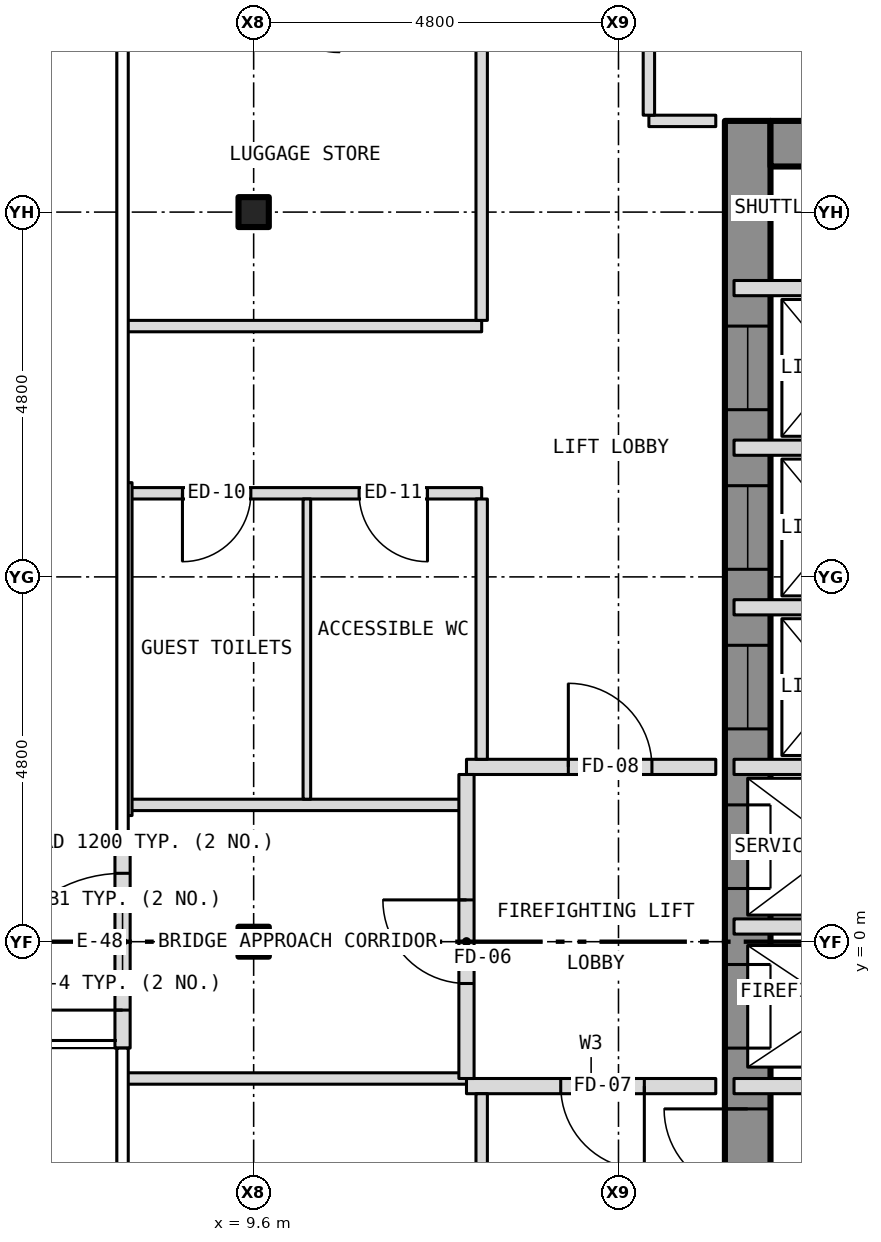
"""IFC4 building model, lengths in metres.
Left out: names, types, materials, properties, quantities, classifications, styles, units other than length and angle.
Written with IfcOpenShell. Run it as: python <this file> out.ifc"""

import sys

from ifc_helpers import new_model, si_unit, direction, frame, frame_2d, origin, origin_2d, place, context, subcontext, project, spatial, rectangle, i_section, extrude, element, fill, save


model = new_model("IFC4")
c1 = context("Model", 3, precision=1e-05, world=origin(), true_north=direction((0.0, 1.0)))
c2 = subcontext(c1, "Body", "Model", "MODEL_VIEW")
j1 = project(units=[si_unit("LENGTHUNIT", "METRE"), si_unit("PLANEANGLEUNIT", "RADIAN")], contexts=[c1])
p1 = place(None, origin())
s1 = spatial("IfcSite", under=j1, at=p1, CompositionType="ELEMENT")
p2 = place(p1, origin())
s2 = spatial("IfcBuilding", under=s1, at=p2, CompositionType="ELEMENT")
p3 = place(p2, frame((0.0, 0.0, 124.0)))
s3 = spatial("IfcBuildingStorey", under=s2, at=p3, CompositionType="ELEMENT", Elevation=124.0)
for number, where, z_axis, x_axis in (
    (1, (9.6, 0.0, -0.15), (0.0, 0.0, 1.0), (1.0, 0.0, 0.0)),
    (2, (9.6, 9.6, -0.15), (0.0, 0.0, 1.0), (1.0, 0.0, 0.0)),
):
    element("IfcColumn", number, at=place(p3, frame(where, z_axis=z_axis, x_axis=x_axis)), inside=s3, PredefinedType="COLUMN", context=c2, shape_type="SweptSolid", body=[
        extrude(i_section(OverallWidth=0.399, OverallDepth=0.394, WebThickness=0.023, FlangeThickness=0.037, at=origin_2d()), origin(), (0.0, 0.0, 1.0), 3.5),
    ])
p4 = place(p3, frame((16.1, -10.8, 0.0), z_axis=(0.0, 0.0, 1.0), x_axis=(0.0, 1.0, 0.0)))
e3 = element("IfcWall", 3, at=p4, inside=s3, PredefinedType="SHEAR", context=c2, shape_type="SweptSolid", body=[
    extrude(rectangle(XDim=21.6, YDim=0.6, at=frame_2d((10.8, 0.0))), origin(), (0.0, 0.0, 1.0), 3.25),
])
p5 = place(p4, frame((9.4, 0.0, 0.0)))
e4 = element("IfcOpeningElement", 4, at=p5, cuts=e3, PredefinedType="OPENING", context=c2, shape_type="SweptSolid", body=[
    extrude(rectangle(XDim=1.1, YDim=2.1, at=frame_2d((0.55, 1.05))), frame((0.0, 0.312, 0.0), z_axis=(0.0, -1.0, 0.0), x_axis=(1.0, 0.0, 0.0)), (0.0, 0.0, 1.0), 0.624),
])
p6 = place(p4, frame((11.5, 0.0, 0.0)))
e5 = element("IfcOpeningElement", 5, at=p6, cuts=e3, PredefinedType="OPENING", context=c2, shape_type="SweptSolid", body=[
    extrude(rectangle(XDim=1.1, YDim=2.1, at=frame_2d((0.55, 1.05))), frame((0.0, 0.312, 0.0), z_axis=(0.0, -1.0, 0.0), x_axis=(1.0, 0.0, 0.0)), (0.0, 0.0, 1.0), 0.624),
])
p7 = place(p4, frame((13.6, 0.0, 0.0)))
e6 = element("IfcOpeningElement", 6, at=p7, cuts=e3, PredefinedType="OPENING", context=c2, shape_type="SweptSolid", body=[
    extrude(rectangle(XDim=1.1, YDim=2.1, at=frame_2d((0.55, 1.05))), frame((0.0, 0.312, 0.0), z_axis=(0.0, -1.0, 0.0), x_axis=(1.0, 0.0, 0.0)), (0.0, 0.0, 1.0), 0.624),
])
p8 = place(p4, frame((15.7, 0.0, 0.0)))
e7 = element("IfcOpeningElement", 7, at=p8, cuts=e3, PredefinedType="OPENING", context=c2, shape_type="SweptSolid", body=[
    extrude(rectangle(XDim=1.1, YDim=2.1, at=frame_2d((0.55, 1.05))), frame((0.0, 0.312, 0.0), z_axis=(0.0, -1.0, 0.0), x_axis=(1.0, 0.0, 0.0)), (0.0, 0.0, 1.0), 0.624),
])
p9 = place(p4, frame((17.8, 0.0, 0.0)))
e8 = element("IfcOpeningElement", 8, at=p9, cuts=e3, PredefinedType="OPENING", context=c2, shape_type="SweptSolid", body=[
    extrude(rectangle(XDim=1.1, YDim=2.1, at=frame_2d((0.55, 1.05))), frame((0.0, 0.312, 0.0), z_axis=(0.0, -1.0, 0.0), x_axis=(1.0, 0.0, 0.0)), (0.0, 0.0, 1.0), 0.624),
])
p10 = place(p4, frame((5.642, 0.0, 0.0)))
e9 = element("IfcOpeningElement", 9, at=p10, cuts=e3, PredefinedType="OPENING", context=c2, shape_type="SweptSolid", body=[
    extrude(rectangle(XDim=1.1, YDim=2.1, at=frame_2d((0.55, 1.05))), frame((0.0, 0.312, 0.0), z_axis=(0.0, -1.0, 0.0), x_axis=(1.0, 0.0, 0.0)), (0.0, 0.0, 1.0), 0.624),
])
p11 = place(p4, frame((7.5, 0.0, 0.0)))
e10 = element("IfcOpeningElement", 10, at=p11, cuts=e3, PredefinedType="OPENING", context=c2, shape_type="SweptSolid", body=[
    extrude(rectangle(XDim=1.1, YDim=2.1, at=frame_2d((0.55, 1.05))), frame((0.0, 0.312, 0.0), z_axis=(0.0, -1.0, 0.0), x_axis=(1.0, 0.0, 0.0)), (0.0, 0.0, 1.0), 0.624),
])
p12 = place(p3, frame((16.4, 10.5, 0.0), z_axis=(0.0, 0.0, 1.0), x_axis=(1.0, 0.0, 0.0)))
e11 = element("IfcWall", 11, at=p12, inside=s3, PredefinedType="SHEAR", context=c2, shape_type="SweptSolid", body=[
    extrude(rectangle(XDim=5.8, YDim=0.6, at=frame_2d((2.9, 0.0))), origin(), (0.0, 0.0, 1.0), 3.25),
])
p13 = place(p3, frame((7.875, -1.4, 0.0), z_axis=(0.0, 0.0, 1.0), x_axis=(0.0, 1.0, 0.0)))
e12 = element("IfcWall", 12, at=p13, inside=s3, PredefinedType="SOLIDWALL", context=c2, shape_type="SweptSolid", body=[
    extrude(rectangle(XDim=2.8, YDim=0.2, at=frame_2d((1.4, 0.0))), origin(), (0.0, 0.0, 1.0), 3.5),
])
p14 = place(p13, frame((0.5, 0.0, 0.0)))
e13 = element("IfcOpeningElement", 13, at=p14, cuts=e12, PredefinedType="OPENING", context=c2, shape_type="SweptSolid", body=[
    extrude(rectangle(XDim=1.8, YDim=2.1, at=frame_2d((0.9, 1.05))), frame((0.0, 0.112, 0.0), z_axis=(0.0, -1.0, 0.0), x_axis=(1.0, 0.0, 0.0)), (0.0, 0.0, 1.0), 0.224),
])
p15 = place(p3, frame((12.4, -1.9, 0.0), z_axis=(0.0, 0.0, 1.0), x_axis=(1.0, 0.0, 0.0)))
e14 = element("IfcWall", 14, at=p15, inside=s3, PredefinedType="PARTITIONING", context=c2, shape_type="SweptSolid", body=[
    extrude(rectangle(XDim=3.28, YDim=0.2, at=frame_2d((1.64, 0.0))), origin(), (0.0, 0.0, 1.0), 3.35),
])
p16 = place(p15, frame((1.24, 0.0, 0.0)))
e15 = element("IfcOpeningElement", 15, at=p16, cuts=e14, PredefinedType="OPENING", context=c2, shape_type="SweptSolid", body=[
    extrude(rectangle(XDim=1.1, YDim=2.1, at=frame_2d((0.55, 1.05))), frame((0.0, 0.112, 0.0), z_axis=(0.0, -1.0, 0.0), x_axis=(1.0, 0.0, 0.0)), (0.0, 0.0, 1.0), 0.224),
])
p17 = place(p3, frame((15.92, -1.9, 0.0), z_axis=(0.0, 0.0, 1.0), x_axis=(1.0, 0.0, 0.0)))
e16 = element("IfcWall", 16, at=p17, inside=s3, PredefinedType="PARTITIONING", context=c2, shape_type="SweptSolid", body=[
    extrude(rectangle(XDim=6.76, YDim=0.2, at=frame_2d((3.38, 0.0))), origin(), (0.0, 0.0, 1.0), 3.25),
])
p18 = place(p3, frame((7.92, -1.8, 0.0), z_axis=(0.0, 0.0, 1.0), x_axis=(1.0, 0.0, 0.0)))
e17 = element("IfcWall", 17, at=p18, inside=s3, PredefinedType="PARTITIONING", context=c2, shape_type="SweptSolid", body=[
    extrude(rectangle(XDim=4.48, YDim=0.15, at=frame_2d((2.24, 0.0))), origin(), (0.0, 0.0, 1.0), 3.35),
])
p19 = place(p3, frame((15.92, 0.2, 0.0), z_axis=(0.0, 0.0, 1.0), x_axis=(1.0, 0.0, 0.0)))
e18 = element("IfcWall", 18, at=p19, inside=s3, PredefinedType="PARTITIONING", context=c2, shape_type="SweptSolid", body=[
    extrude(rectangle(XDim=2.88, YDim=0.2, at=frame_2d((1.44, 0.0))), origin(), (0.0, 0.0, 1.0), 3.25),
])
p20 = place(p3, frame((7.95, 1.8, 0.0), z_axis=(0.0, 0.0, 1.0), x_axis=(1.0, 0.0, 0.0)))
e19 = element("IfcWall", 19, at=p20, inside=s3, PredefinedType="PARTITIONING", context=c2, shape_type="SweptSolid", body=[
    extrude(rectangle(XDim=4.45, YDim=0.15, at=frame_2d((2.225, 0.0))), origin(), (0.0, 0.0, 1.0), 3.35),
])
p21 = place(p3, frame((12.4, 2.3, 0.0), z_axis=(0.0, 0.0, 1.0), x_axis=(1.0, 0.0, 0.0)))
e20 = element("IfcWall", 20, at=p21, inside=s3, PredefinedType="PARTITIONING", context=c2, shape_type="SweptSolid", body=[
    extrude(rectangle(XDim=3.28, YDim=0.2, at=frame_2d((1.64, 0.0))), origin(), (0.0, 0.0, 1.0), 3.35),
])
p22 = place(p21, frame((1.34, 0.0, 0.0)))
e21 = element("IfcOpeningElement", 21, at=p22, cuts=e20, PredefinedType="OPENING", context=c2, shape_type="SweptSolid", body=[
    extrude(rectangle(XDim=1.1, YDim=2.1, at=frame_2d((0.55, 1.05))), frame((0.0, 0.112, 0.0), z_axis=(0.0, -1.0, 0.0), x_axis=(1.0, 0.0, 0.0)), (0.0, 0.0, 1.0), 0.224),
])
for number, where, z_axis, x_axis in (
    (22, (15.92, 2.3, 0.0), (0.0, 0.0, 1.0), (1.0, 0.0, 0.0)),
    (23, (15.92, 4.4, 0.0), (0.0, 0.0, 1.0), (1.0, 0.0, 0.0)),
):
    element("IfcWall", number, at=place(p3, frame(where, z_axis=z_axis, x_axis=x_axis)), inside=s3, PredefinedType="PARTITIONING", context=c2, shape_type="SweptSolid", body=[
        extrude(rectangle(XDim=2.88, YDim=0.2, at=frame_2d((1.44, 0.0))), origin(), (0.0, 0.0, 1.0), 3.25),
    ])
p23 = place(p3, frame((7.95, 5.9, 0.0), z_axis=(0.0, 0.0, 1.0), x_axis=(1.0, 0.0, 0.0)))
e24 = element("IfcWall", 24, at=p23, inside=s3, PredefinedType="PARTITIONING", context=c2, shape_type="SweptSolid", body=[
    extrude(rectangle(XDim=4.65, YDim=0.15, at=frame_2d((2.325, 0.0))), origin(), (0.0, 0.0, 1.0), 3.35),
])
p24 = place(p23, frame((0.713, 0.0, 0.0)))
e25 = element("IfcOpeningElement", 25, at=p24, cuts=e24, PredefinedType="OPENING", context=c2, shape_type="SweptSolid", body=[
    extrude(rectangle(XDim=0.9, YDim=2.1, at=frame_2d((0.45, 1.05))), frame((0.0, 0.087, 0.0), z_axis=(0.0, -1.0, 0.0), x_axis=(1.0, 0.0, 0.0)), (0.0, 0.0, 1.0), 0.174),
])
p25 = place(p23, frame((3.037, 0.0, 0.0)))
e26 = element("IfcOpeningElement", 26, at=p25, cuts=e24, PredefinedType="OPENING", context=c2, shape_type="SweptSolid", body=[
    extrude(rectangle(XDim=0.9, YDim=2.1, at=frame_2d((0.45, 1.05))), frame((0.0, 0.087, 0.0), z_axis=(0.0, -1.0, 0.0), x_axis=(1.0, 0.0, 0.0)), (0.0, 0.0, 1.0), 0.174),
])
p26 = place(p3, frame((15.92, 6.5, 0.0), z_axis=(0.0, 0.0, 1.0), x_axis=(1.0, 0.0, 0.0)))
e27 = element("IfcWall", 27, at=p26, inside=s3, PredefinedType="PARTITIONING", context=c2, shape_type="SweptSolid", body=[
    extrude(rectangle(XDim=2.88, YDim=0.2, at=frame_2d((1.44, 0.0))), origin(), (0.0, 0.0, 1.0), 3.25),
])
p27 = place(p3, frame((7.92, 8.1, 0.0), z_axis=(0.0, 0.0, 1.0), x_axis=(1.0, 0.0, 0.0)))
e28 = element("IfcWall", 28, at=p27, inside=s3, PredefinedType="PARTITIONING", context=c2, shape_type="SweptSolid", body=[
    extrude(rectangle(XDim=4.68, YDim=0.15, at=frame_2d((2.34, 0.0))), origin(), (0.0, 0.0, 1.0), 3.35),
])
p28 = place(p3, frame((15.92, 8.6, 0.0), z_axis=(0.0, 0.0, 1.0), x_axis=(1.0, 0.0, 0.0)))
e29 = element("IfcWall", 29, at=p28, inside=s3, PredefinedType="PARTITIONING", context=c2, shape_type="SweptSolid", body=[
    extrude(rectangle(XDim=2.88, YDim=0.2, at=frame_2d((1.44, 0.0))), origin(), (0.0, 0.0, 1.0), 3.25),
])
p29 = place(p3, frame((14.8, 10.8, 0.0), z_axis=(0.0, 0.0, 1.0), x_axis=(1.0, 0.0, 0.0)))
e30 = element("IfcWall", 30, at=p29, inside=s3, PredefinedType="PARTITIONING", context=c2, shape_type="SweptSolid", body=[
    extrude(rectangle(XDim=0.88, YDim=0.15, at=frame_2d((0.44, 0.0))), origin(), (0.0, 0.0, 1.0), 3.35),
])
p30 = place(p3, frame((7.95, 1.66, 0.0), z_axis=(0.0, 0.0, 1.0), x_axis=(0.0, 1.0, 0.0)))
e31 = element("IfcWall", 31, at=p30, inside=s3, PredefinedType="PARTITIONING", context=c2, shape_type="SweptSolid", body=[
    extrude(rectangle(XDim=4.38, YDim=0.1, at=frame_2d((2.19, 0.0))), origin(), (0.0, 0.0, 1.0), 2.733),
])
p31 = place(p3, frame((10.3, 1.875, 0.0), z_axis=(0.0, 0.0, 1.0), x_axis=(0.0, 1.0, 0.0)))
e32 = element("IfcWall", 32, at=p31, inside=s3, PredefinedType="PARTITIONING", context=c2, shape_type="SweptSolid", body=[
    extrude(rectangle(XDim=3.95, YDim=0.1, at=frame_2d((1.975, 0.0))), origin(), (0.0, 0.0, 1.0), 3.35),
])
p32 = place(p3, frame((12.4, -1.8, 0.0), z_axis=(0.0, 0.0, 1.0), x_axis=(0.0, 1.0, 0.0)))
e33 = element("IfcWall", 33, at=p32, inside=s3, PredefinedType="PARTITIONING", context=c2, shape_type="SweptSolid", body=[
    extrude(rectangle(XDim=4.0, YDim=0.2, at=frame_2d((2.0, 0.0))), origin(), (0.0, 0.0, 1.0), 3.35),
])
p33 = place(p32, frame((1.25, 0.0, 0.0)))
e34 = element("IfcOpeningElement", 34, at=p33, cuts=e33, PredefinedType="OPENING", context=c2, shape_type="SweptSolid", body=[
    extrude(rectangle(XDim=1.1, YDim=2.1, at=frame_2d((0.55, 1.05))), frame((0.0, 0.112, 0.0), z_axis=(0.0, -1.0, 0.0), x_axis=(1.0, 0.0, 0.0)), (0.0, 0.0, 1.0), 0.224),
])
p34 = place(p3, frame((12.6, -12.525, 0.0), z_axis=(0.0, 0.0, 1.0), x_axis=(0.0, 1.0, 0.0)))
e35 = element("IfcWall", 35, at=p34, inside=s3, PredefinedType="PARTITIONING", context=c2, shape_type="SweptSolid", body=[
    extrude(rectangle(XDim=10.525, YDim=0.15, at=frame_2d((5.262, 0.0))), origin(), (0.0, 0.0, 1.0), 3.35),
])
p35 = place(p34, frame((4.825, 0.0, 0.0)))
e36 = element("IfcOpeningElement", 36, at=p35, cuts=e35, PredefinedType="OPENING", context=c2, shape_type="SweptSolid", body=[
    extrude(rectangle(XDim=0.9, YDim=2.1, at=frame_2d((0.45, 1.05))), frame((0.0, 0.087, 0.0), z_axis=(0.0, -1.0, 0.0), x_axis=(1.0, 0.0, 0.0)), (0.0, 0.0, 1.0), 0.174),
])
p36 = place(p3, frame((12.6, 2.4, 0.0), z_axis=(0.0, 0.0, 1.0), x_axis=(0.0, 1.0, 0.0)))
e37 = element("IfcWall", 37, at=p36, inside=s3, PredefinedType="PARTITIONING", context=c2, shape_type="SweptSolid", body=[
    extrude(rectangle(XDim=3.425, YDim=0.15, at=frame_2d((1.712, 0.0))), origin(), (0.0, 0.0, 1.0), 3.35),
])
p37 = place(p3, frame((12.6, 8.175, 0.0), z_axis=(0.0, 0.0, 1.0), x_axis=(0.0, 1.0, 0.0)))
e38 = element("IfcWall", 38, at=p37, inside=s3, PredefinedType="PARTITIONING", context=c2, shape_type="SweptSolid", body=[
    extrude(rectangle(XDim=4.35, YDim=0.15, at=frame_2d((2.175, 0.0))), origin(), (0.0, 0.0, 1.0), 3.35),
])
p38 = place(p3, frame((14.8, 10.875, 0.0), z_axis=(0.0, 0.0, 1.0), x_axis=(0.0, 1.0, 0.0)))
e39 = element("IfcWall", 39, at=p38, inside=s3, PredefinedType="PARTITIONING", context=c2, shape_type="SweptSolid", body=[
    extrude(rectangle(XDim=3.85, YDim=0.15, at=frame_2d((1.925, 0.0))), origin(), (0.0, 0.0, 1.0), 3.35),
])
p39 = place(p38, frame((2.325, 0.0, 0.0)))
e40 = element("IfcOpeningElement", 40, at=p39, cuts=e39, PredefinedType="OPENING", context=c2, shape_type="SweptSolid", body=[
    extrude(rectangle(XDim=1.0, YDim=2.1, at=frame_2d((0.5, 1.05))), frame((0.0, 0.087, 0.0), z_axis=(0.0, -1.0, 0.0), x_axis=(1.0, 0.0, 0.0)), (0.0, 0.0, 1.0), 0.174),
])
p40 = place(p14, origin())
e41 = element("IfcDoor", 41, at=p40, inside=s3, OperationType="DOUBLE_DOOR_DOUBLE_SWING", PredefinedType="DOOR", context=c2, shape_type="SweptSolid", body=[
    extrude(rectangle(XDim=1.8, YDim=2.1, at=frame_2d((0.9, 1.05))), frame((0.0, 0.025, 0.0), z_axis=(0.0, -1.0, 0.0), x_axis=(1.0, 0.0, 0.0)), (0.0, 0.0, 1.0), 0.05),
])
fill(e13, e41)
p41 = place(p5, origin())
e42 = element("IfcDoor", 42, at=p41, inside=s3, OperationType="SLIDING_TO_LEFT", PredefinedType="DOOR", context=c2, shape_type="SweptSolid", body=[
    extrude(rectangle(XDim=1.1, YDim=2.1, at=frame_2d((0.55, 1.05))), frame((0.0, 0.025, 0.0), z_axis=(0.0, -1.0, 0.0), x_axis=(1.0, 0.0, 0.0)), (0.0, 0.0, 1.0), 0.05),
])
fill(e4, e42)
p42 = place(p6, origin())
e43 = element("IfcDoor", 43, at=p42, inside=s3, OperationType="SLIDING_TO_LEFT", PredefinedType="DOOR", context=c2, shape_type="SweptSolid", body=[
    extrude(rectangle(XDim=1.1, YDim=2.1, at=frame_2d((0.55, 1.05))), frame((0.0, 0.025, 0.0), z_axis=(0.0, -1.0, 0.0), x_axis=(1.0, 0.0, 0.0)), (0.0, 0.0, 1.0), 0.05),
])
fill(e5, e43)
p43 = place(p7, origin())
e44 = element("IfcDoor", 44, at=p43, inside=s3, OperationType="SLIDING_TO_LEFT", PredefinedType="DOOR", context=c2, shape_type="SweptSolid", body=[
    extrude(rectangle(XDim=1.1, YDim=2.1, at=frame_2d((0.55, 1.05))), frame((0.0, 0.025, 0.0), z_axis=(0.0, -1.0, 0.0), x_axis=(1.0, 0.0, 0.0)), (0.0, 0.0, 1.0), 0.05),
])
fill(e6, e44)
p44 = place(p8, origin())
e45 = element("IfcDoor", 45, at=p44, inside=s3, OperationType="SLIDING_TO_LEFT", PredefinedType="DOOR", context=c2, shape_type="SweptSolid", body=[
    extrude(rectangle(XDim=1.1, YDim=2.1, at=frame_2d((0.55, 1.05))), frame((0.0, 0.025, 0.0), z_axis=(0.0, -1.0, 0.0), x_axis=(1.0, 0.0, 0.0)), (0.0, 0.0, 1.0), 0.05),
])
fill(e7, e45)
p45 = place(p9, origin())
e46 = element("IfcDoor", 46, at=p45, inside=s3, OperationType="SLIDING_TO_LEFT", PredefinedType="DOOR", context=c2, shape_type="SweptSolid", body=[
    extrude(rectangle(XDim=1.1, YDim=2.1, at=frame_2d((0.55, 1.05))), frame((0.0, 0.025, 0.0), z_axis=(0.0, -1.0, 0.0), x_axis=(1.0, 0.0, 0.0)), (0.0, 0.0, 1.0), 0.05),
])
fill(e8, e46)
p46 = place(p11, origin())
e47 = element("IfcDoor", 47, at=p46, inside=s3, OperationType="SINGLE_SWING_RIGHT", PredefinedType="DOOR", context=c2, shape_type="SweptSolid", body=[
    extrude(rectangle(XDim=1.1, YDim=2.1, at=frame_2d((0.55, 1.05))), frame((0.0, 0.025, 0.0), z_axis=(0.0, -1.0, 0.0), x_axis=(1.0, 0.0, 0.0)), (0.0, 0.0, 1.0), 0.05),
])
fill(e10, e47)
p47 = place(p33, origin())
e48 = element("IfcDoor", 48, at=p47, inside=s3, OperationType="SINGLE_SWING_RIGHT", PredefinedType="DOOR", context=c2, shape_type="SweptSolid", body=[
    extrude(rectangle(XDim=1.1, YDim=2.1, at=frame_2d((0.55, 1.05))), frame((0.0, 0.025, 0.0), z_axis=(0.0, -1.0, 0.0), x_axis=(1.0, 0.0, 0.0)), (0.0, 0.0, 1.0), 0.05),
])
fill(e34, e48)
p48 = place(p16, origin())
e49 = element("IfcDoor", 49, at=p48, inside=s3, OperationType="SINGLE_SWING_RIGHT", PredefinedType="DOOR", context=c2, shape_type="SweptSolid", body=[
    extrude(rectangle(XDim=1.1, YDim=2.1, at=frame_2d((0.55, 1.05))), frame((0.0, 0.025, 0.0), z_axis=(0.0, -1.0, 0.0), x_axis=(1.0, 0.0, 0.0)), (0.0, 0.0, 1.0), 0.05),
])
fill(e15, e49)
p49 = place(p22, origin())
e50 = element("IfcDoor", 50, at=p49, inside=s3, OperationType="SINGLE_SWING_LEFT", PredefinedType="DOOR", context=c2, shape_type="SweptSolid", body=[
    extrude(rectangle(XDim=1.1, YDim=2.1, at=frame_2d((0.55, 1.05))), frame((0.0, 0.025, 0.0), z_axis=(0.0, -1.0, 0.0), x_axis=(1.0, 0.0, 0.0)), (0.0, 0.0, 1.0), 0.05),
])
fill(e21, e50)
p50 = place(p24, origin())
e51 = element("IfcDoor", 51, at=p50, inside=s3, OperationType="SINGLE_SWING_LEFT", PredefinedType="DOOR", context=c2, shape_type="SweptSolid", body=[
    extrude(rectangle(XDim=0.9, YDim=2.1, at=frame_2d((0.45, 1.05))), frame((0.0, 0.025, 0.0), z_axis=(0.0, -1.0, 0.0), x_axis=(1.0, 0.0, 0.0)), (0.0, 0.0, 1.0), 0.05),
])
fill(e25, e51)
p51 = place(p25, origin())
e52 = element("IfcDoor", 52, at=p51, inside=s3, OperationType="SINGLE_SWING_RIGHT", PredefinedType="DOOR", context=c2, shape_type="SweptSolid", body=[
    extrude(rectangle(XDim=0.9, YDim=2.1, at=frame_2d((0.45, 1.05))), frame((0.0, 0.025, 0.0), z_axis=(0.0, -1.0, 0.0), x_axis=(1.0, 0.0, 0.0)), (0.0, 0.0, 1.0), 0.05),
])
fill(e26, e52)
save(model, sys.argv[1])
